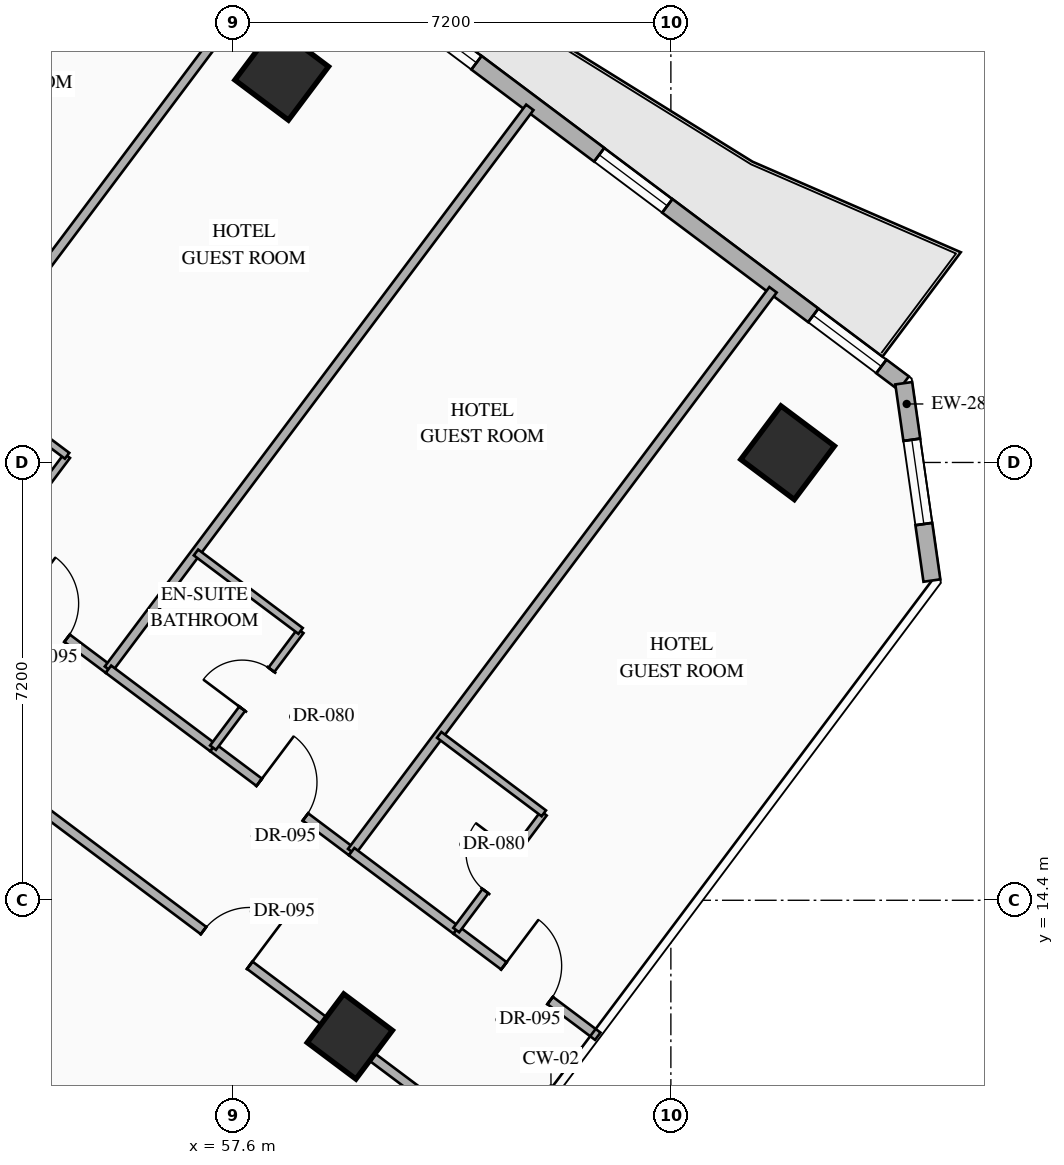
"""IFC4 building model, lengths in metres.
Left out: names, types, materials, properties, quantities, classifications, styles, units other than length and angle.
Written with IfcOpenShell. Run it as: python <this file> out.ifc"""

import sys

from ifc_helpers import new_model, si_unit, direction, frame, frame_2d, origin, origin_2d, place, context, subcontext, project, spatial, rectangle, hollow_rectangle, extrude, element, fill, save


model = new_model("IFC4")
c1 = context("Model", 3, precision=1e-05, world=origin(), true_north=direction((0.0, 1.0)))
c2 = subcontext(c1, "Body", "Model", "MODEL_VIEW")
j1 = project(units=[si_unit("LENGTHUNIT", "METRE"), si_unit("PLANEANGLEUNIT", "RADIAN")], contexts=[c1])
p1 = place(None, origin())
s1 = spatial("IfcSite", under=j1, at=p1, CompositionType="ELEMENT")
p2 = place(p1, origin())
s2 = spatial("IfcBuilding", under=s1, at=p2, CompositionType="ELEMENT")
p3 = place(p2, frame((0.0, 0.0, 56.7)))
s3 = spatial("IfcBuildingStorey", under=s2, at=p3, CompositionType="ELEMENT", Elevation=56.7)
for number, where, z_axis, x_axis in (
    (1, (58.4, 28.0, 0.0), (0.0, 0.0, 1.0), (0.8, -0.6, 0.0)),
    (2, (66.72, 21.76, 0.0), (0.0, 0.0, 1.0), (0.8, -0.6, 0.0)),
):
    element("IfcColumn", number, at=place(p3, frame(where, z_axis=z_axis, x_axis=x_axis)), inside=s3, PredefinedType="COLUMN", context=c2, shape_type="SweptSolid", body=[
        extrude(hollow_rectangle(XDim=1.1, YDim=1.1, WallThickness=0.04, at=origin_2d()), origin(), (0.0, 0.0, 1.0), 3.35),
    ])
p4 = place(p3, frame((59.52, 12.16, 0.0), z_axis=(0.0, 0.0, 1.0), x_axis=(0.799999996291, -0.600000004945, 0.0)))
e3 = element("IfcColumn", 3, at=p4, inside=s3, PredefinedType="COLUMN", context=c2, shape_type="SweptSolid", body=[
    extrude(hollow_rectangle(XDim=1.0, YDim=1.0, WallThickness=0.038, at=origin_2d()), origin(), (0.0, 0.0, 1.0), 3.35),
])
p5 = place(p3, frame((44.86, 40.73, 0.0), z_axis=(0.0, 0.0, 1.0), x_axis=(0.800006902154, -0.599990797017, 0.0)))
e4 = element("IfcWall", 4, at=p5, inside=s3, PredefinedType="STANDARD", context=c2, shape_type="SweptSolid", body=[
    extrude(rectangle(XDim=29.712, YDim=0.28, at=frame_2d((14.856, 0.0))), origin(), (0.0, 0.0, 1.0), 3.13),
])
p6 = place(p5, frame((14.249, 0.0, 0.0)))
e5 = element("IfcOpeningElement", 5, at=p6, cuts=e4, PredefinedType="OPENING", context=c2, shape_type="SweptSolid", body=[
    extrude(rectangle(XDim=1.1, YDim=2.2, at=frame_2d((0.55, 1.1))), frame((0.0, 0.15, 0.0), z_axis=(0.0, -1.0, 0.0), x_axis=(1.0, 0.0, 0.0)), (0.0, 0.0, 1.0), 0.3),
])
p7 = place(p5, frame((1.612, 0.0, 0.85)))
e6 = element("IfcOpeningElement", 6, at=p7, cuts=e4, PredefinedType="OPENING", context=c2, shape_type="SweptSolid", body=[
    extrude(rectangle(XDim=1.4, YDim=1.8, at=frame_2d((0.7, 0.9))), frame((0.0, 0.15, 0.0), z_axis=(0.0, -1.0, 0.0), x_axis=(1.0, 0.0, 0.0)), (0.0, 0.0, 1.0), 0.3),
])
p8 = place(p5, frame((5.667, 0.0, 0.85)))
e7 = element("IfcOpeningElement", 7, at=p8, cuts=e4, PredefinedType="OPENING", context=c2, shape_type="SweptSolid", body=[
    extrude(rectangle(XDim=1.4, YDim=1.8, at=frame_2d((0.7, 0.9))), frame((0.0, 0.15, 0.0), z_axis=(0.0, -1.0, 0.0), x_axis=(1.0, 0.0, 0.0)), (0.0, 0.0, 1.0), 0.3),
])
p9 = place(p5, frame((9.912, 0.0, 0.85)))
e8 = element("IfcOpeningElement", 8, at=p9, cuts=e4, PredefinedType="OPENING", context=c2, shape_type="SweptSolid", body=[
    extrude(rectangle(XDim=1.4, YDim=1.8, at=frame_2d((0.7, 0.9))), frame((0.0, 0.15, 0.0), z_axis=(0.0, -1.0, 0.0), x_axis=(1.0, 0.0, 0.0)), (0.0, 0.0, 1.0), 0.3),
])
p10 = place(p5, frame((19.528, 0.0, 0.85)))
e9 = element("IfcOpeningElement", 9, at=p10, cuts=e4, PredefinedType="OPENING", context=c2, shape_type="SweptSolid", body=[
    extrude(rectangle(XDim=1.4, YDim=1.8, at=frame_2d((0.7, 0.9))), frame((0.0, 0.15, 0.0), z_axis=(0.0, -1.0, 0.0), x_axis=(1.0, 0.0, 0.0)), (0.0, 0.0, 1.0), 0.3),
])
p11 = place(p5, frame((23.451, 0.0, 0.85)))
e10 = element("IfcOpeningElement", 10, at=p11, cuts=e4, PredefinedType="OPENING", context=c2, shape_type="SweptSolid", body=[
    extrude(rectangle(XDim=1.4, YDim=1.8, at=frame_2d((0.7, 0.9))), frame((0.0, 0.15, 0.0), z_axis=(0.0, -1.0, 0.0), x_axis=(1.0, 0.0, 0.0)), (0.0, 0.0, 1.0), 0.3),
])
p12 = place(p5, frame((27.852, 0.0, 0.85)))
e11 = element("IfcOpeningElement", 11, at=p12, cuts=e4, PredefinedType="OPENING", context=c2, shape_type="SweptSolid", body=[
    extrude(rectangle(XDim=1.4, YDim=1.8, at=frame_2d((0.7, 0.9))), frame((0.0, 0.15, 0.0), z_axis=(0.0, -1.0, 0.0), x_axis=(1.0, 0.0, 0.0)), (0.0, 0.0, 1.0), 0.3),
])
p13 = place(p3, frame((68.63, 22.903, 0.0), z_axis=(0.0, 0.0, 1.0), x_axis=(0.141285803956, -0.989968848803, 0.0)))
e12 = element("IfcWall", 12, at=p13, inside=s3, PredefinedType="STANDARD", context=c2, shape_type="SweptSolid", body=[
    extrude(rectangle(XDim=3.278, YDim=0.28, at=frame_2d((1.639, 0.0))), origin(), (0.0, 0.0, 1.0), 3.13),
])
p14 = place(p13, frame((0.939, 0.0, 0.85)))
e13 = element("IfcOpeningElement", 13, at=p14, cuts=e12, PredefinedType="OPENING", context=c2, shape_type="SweptSolid", body=[
    extrude(rectangle(XDim=1.4, YDim=1.8, at=frame_2d((0.7, 0.9))), frame((0.0, 0.15, 0.0), z_axis=(0.0, -1.0, 0.0), x_axis=(1.0, 0.0, 0.0)), (0.0, 0.0, 1.0), 0.3),
])
for number, where, z_axis, x_axis in (
    (14, (47.87, 23.96, 0.0), (0.0, 0.0, 1.0), (0.6, 0.8, 0.0)),
    (15, (51.71, 21.08, 0.0), (0.0, 0.0, 1.0), (0.6, 0.8, 0.0)),
):
    element("IfcWall", number, at=place(p3, frame(where, z_axis=z_axis, x_axis=x_axis)), inside=s3, PredefinedType="PARTITIONING", context=c2, shape_type="SweptSolid", body=[
        extrude(rectangle(XDim=11.55, YDim=0.15, at=frame_2d((5.775, 0.0))), origin(), (0.0, 0.0, 1.0), 3.13),
    ])
p15 = place(p3, frame((53.43, 19.79, 0.0), z_axis=(0.0, 0.0, 1.0), x_axis=(0.8, -0.6, 0.0)))
e16 = element("IfcWall", 16, at=p15, inside=s3, PredefinedType="PARTITIONING", context=c2, shape_type="SweptSolid", body=[
    extrude(rectangle(XDim=2.65, YDim=0.15, at=frame_2d((1.325, 0.0))), origin(), (0.0, 0.0, 1.0), 2.775),
])
p16 = place(p15, frame((0.85, 0.0, 0.0)))
e17 = element("IfcOpeningElement", 17, at=p16, cuts=e16, PredefinedType="OPENING", context=c2, shape_type="SweptSolid", body=[
    extrude(rectangle(XDim=0.95, YDim=2.15, at=frame_2d((0.475, 1.075))), frame((0.0, 0.085, 0.0), z_axis=(0.0, -1.0, 0.0), x_axis=(1.0, 0.0, 0.0)), (0.0, 0.0, 1.0), 0.17),
])
p17 = place(p3, frame((53.43, 19.79, 0.0), z_axis=(0.0, 0.0, 1.0), x_axis=(0.600065100855, 0.79995117022, 0.0)))
e18 = element("IfcWall", 18, at=p17, inside=s3, PredefinedType="PARTITIONING", context=c2, shape_type="SweptSolid", body=[
    extrude(rectangle(XDim=2.4, YDim=0.12, at=frame_2d((1.2, 0.0))), origin(), (0.0, 0.0, 1.0), 3.13),
])
p18 = place(p17, frame((0.8, 0.0, 0.0)))
e19 = element("IfcOpeningElement", 19, at=p18, cuts=e18, PredefinedType="OPENING", context=c2, shape_type="SweptSolid", body=[
    extrude(rectangle(XDim=0.8, YDim=2.06, at=frame_2d((0.4, 1.03))), frame((0.0, 0.07, 0.0), z_axis=(0.0, -1.0, 0.0), x_axis=(1.0, 0.0, 0.0)), (0.0, 0.0, 1.0), 0.14),
])
p19 = place(p3, frame((53.15, 23.0, 0.0), z_axis=(0.0, 0.0, 1.0), x_axis=(0.800027249606, -0.599963665473, 0.0)))
e20 = element("IfcWall", 20, at=p19, inside=s3, PredefinedType="PARTITIONING", context=c2, shape_type="SweptSolid", body=[
    extrude(rectangle(XDim=2.15, YDim=0.12, at=frame_2d((1.075, 0.0))), origin(), (0.0, 0.0, 1.0), 3.13),
])
p20 = place(p3, frame((55.55, 18.2, 0.0), z_axis=(0.0, 0.0, 1.0), x_axis=(0.599996617946, 0.80000253653, 0.0)))
e21 = element("IfcWall", 21, at=p20, inside=s3, PredefinedType="PARTITIONING", context=c2, shape_type="SweptSolid", body=[
    extrude(rectangle(XDim=11.55, YDim=0.15, at=frame_2d((5.775, 0.0))), origin(), (0.0, 0.0, 1.0), 3.13),
])
p21 = place(p3, frame((55.55, 18.2, 0.0), z_axis=(0.0, 0.0, 1.0), x_axis=(0.79998637334, -0.60001816845, 0.0)))
e22 = element("IfcWall", 22, at=p21, inside=s3, PredefinedType="PARTITIONING", context=c2, shape_type="SweptSolid", body=[
    extrude(rectangle(XDim=2.15, YDim=0.15, at=frame_2d((1.075, 0.0))), origin(), (0.0, 0.0, 1.0), 2.775),
])
p22 = place(p3, frame((57.27, 16.91, 0.0), z_axis=(0.0, 0.0, 1.0), x_axis=(0.800010279488, -0.599986293772, 0.0)))
e23 = element("IfcWall", 23, at=p22, inside=s3, PredefinedType="PARTITIONING", context=c2, shape_type="SweptSolid", body=[
    extrude(rectangle(XDim=2.85, YDim=0.15, at=frame_2d((1.425, 0.0))), origin(), (0.0, 0.0, 1.0), 2.775),
])
p23 = place(p22, frame((0.95, 0.0, 0.0)))
e24 = element("IfcOpeningElement", 24, at=p23, cuts=e23, PredefinedType="OPENING", context=c2, shape_type="SweptSolid", body=[
    extrude(rectangle(XDim=0.95, YDim=2.15, at=frame_2d((0.475, 1.075))), frame((0.0, 0.085, 0.0), z_axis=(0.0, -1.0, 0.0), x_axis=(1.0, 0.0, 0.0)), (0.0, 0.0, 1.0), 0.17),
])
p24 = place(p3, frame((57.27, 16.91, 0.0), z_axis=(0.0, 0.0, 1.0), x_axis=(0.599951172744, 0.800036618114, 0.0)))
e25 = element("IfcWall", 25, at=p24, inside=s3, PredefinedType="PARTITIONING", context=c2, shape_type="SweptSolid", body=[
    extrude(rectangle(XDim=2.4, YDim=0.12, at=frame_2d((1.2, 0.0))), origin(), (0.0, 0.0, 1.0), 3.13),
])
p25 = place(p24, frame((0.8, 0.0, 0.0)))
e26 = element("IfcOpeningElement", 26, at=p25, cuts=e25, PredefinedType="OPENING", context=c2, shape_type="SweptSolid", body=[
    extrude(rectangle(XDim=0.8, YDim=2.06, at=frame_2d((0.4, 1.03))), frame((0.0, 0.07, 0.0), z_axis=(0.0, -1.0, 0.0), x_axis=(1.0, 0.0, 0.0)), (0.0, 0.0, 1.0), 0.14),
])
p26 = place(p3, frame((56.99, 20.12, 0.0), z_axis=(0.0, 0.0, 1.0), x_axis=(0.79998637334, -0.60001816845, 0.0)))
e27 = element("IfcWall", 27, at=p26, inside=s3, PredefinedType="PARTITIONING", context=c2, shape_type="SweptSolid", body=[
    extrude(rectangle(XDim=2.15, YDim=0.12, at=frame_2d((1.075, 0.0))), origin(), (0.0, 0.0, 1.0), 3.13),
])
p27 = place(p3, frame((59.55, 15.2, 0.0), z_axis=(0.0, 0.0, 1.0), x_axis=(0.599996617946, 0.80000253653, 0.0)))
e28 = element("IfcWall", 28, at=p27, inside=s3, PredefinedType="PARTITIONING", context=c2, shape_type="SweptSolid", body=[
    extrude(rectangle(XDim=11.55, YDim=0.15, at=frame_2d((5.775, 0.0))), origin(), (0.0, 0.0, 1.0), 3.13),
])
p28 = place(p3, frame((59.55, 15.2, 0.0), z_axis=(0.0, 0.0, 1.0), x_axis=(0.79998637334, -0.60001816845, 0.0)))
e29 = element("IfcWall", 29, at=p28, inside=s3, PredefinedType="PARTITIONING", context=c2, shape_type="SweptSolid", body=[
    extrude(rectangle(XDim=2.15, YDim=0.15, at=frame_2d((1.075, 0.0))), origin(), (0.0, 0.0, 1.0), 2.775),
])
p29 = place(p3, frame((61.27, 13.91, 0.0), z_axis=(0.0, 0.0, 1.0), x_axis=(0.800010068184, -0.59998657552, 0.0)))
e30 = element("IfcWall", 30, at=p29, inside=s3, PredefinedType="PARTITIONING", context=c2, shape_type="SweptSolid", body=[
    extrude(rectangle(XDim=2.91, YDim=0.15, at=frame_2d((1.455, 0.0))), origin(), (0.0, 0.0, 1.0), 3.13),
])
p30 = place(p29, frame((0.98, 0.0, 0.0)))
e31 = element("IfcOpeningElement", 31, at=p30, cuts=e30, PredefinedType="OPENING", context=c2, shape_type="SweptSolid", body=[
    extrude(rectangle(XDim=0.95, YDim=2.15, at=frame_2d((0.475, 1.075))), frame((0.0, 0.085, 0.0), z_axis=(0.0, -1.0, 0.0), x_axis=(1.0, 0.0, 0.0)), (0.0, 0.0, 1.0), 0.17),
])
p31 = place(p3, frame((61.27, 13.91, 0.0), z_axis=(0.0, 0.0, 1.0), x_axis=(0.599951172744, 0.800036618114, 0.0)))
e32 = element("IfcWall", 32, at=p31, inside=s3, PredefinedType="PARTITIONING", context=c2, shape_type="SweptSolid", body=[
    extrude(rectangle(XDim=2.4, YDim=0.12, at=frame_2d((1.2, 0.0))), origin(), (0.0, 0.0, 1.0), 3.13),
])
p32 = place(p31, frame((0.8, 0.0, 0.0)))
e33 = element("IfcOpeningElement", 33, at=p32, cuts=e32, PredefinedType="OPENING", context=c2, shape_type="SweptSolid", body=[
    extrude(rectangle(XDim=0.8, YDim=2.06, at=frame_2d((0.4, 1.03))), frame((0.0, 0.07, 0.0), z_axis=(0.0, -1.0, 0.0), x_axis=(1.0, 0.0, 0.0)), (0.0, 0.0, 1.0), 0.14),
])
p33 = place(p3, frame((60.99, 17.12, 0.0), z_axis=(0.0, 0.0, 1.0), x_axis=(0.79998637334, -0.60001816845, 0.0)))
e34 = element("IfcWall", 34, at=p33, inside=s3, PredefinedType="PARTITIONING", context=c2, shape_type="SweptSolid", body=[
    extrude(rectangle(XDim=2.15, YDim=0.12, at=frame_2d((1.075, 0.0))), origin(), (0.0, 0.0, 1.0), 3.13),
])
p34 = place(p3, frame((52.89, 17.07, 0.0), z_axis=(0.0, 0.0, 1.0), x_axis=(0.8, -0.6, 0.0)))
e35 = element("IfcWall", 35, at=p34, inside=s3, PredefinedType="PARTITIONING", context=c2, shape_type="SweptSolid", body=[
    extrude(rectangle(XDim=11.51, YDim=0.15, at=frame_2d((5.755, 0.0))), origin(), (0.0, 0.0, 1.0), 2.425),
])
p35 = place(p34, frame((5.28, 0.0, 0.0)))
e36 = element("IfcOpeningElement", 36, at=p35, cuts=e35, PredefinedType="OPENING", context=c2, shape_type="SweptSolid", body=[
    extrude(rectangle(XDim=0.95, YDim=2.15, at=frame_2d((0.475, 1.075))), frame((0.0, 0.085, 0.0), z_axis=(0.0, -1.0, 0.0), x_axis=(1.0, 0.0, 0.0)), (0.0, 0.0, 1.0), 0.17),
])
p36 = place(p10, origin())
e37 = element("IfcWindow", 37, at=p36, inside=s3, PartitioningType="SINGLE_PANEL", PredefinedType="WINDOW", context=c2, shape_type="SweptSolid", body=[
    extrude(rectangle(XDim=1.4, YDim=1.8, at=frame_2d((0.7, 0.9))), frame((0.0, 0.03, 0.0), z_axis=(0.0, -1.0, 0.0), x_axis=(1.0, 0.0, 0.0)), (0.0, 0.0, 1.0), 0.06),
])
fill(e9, e37)
p37 = place(p11, origin())
e38 = element("IfcWindow", 38, at=p37, inside=s3, PartitioningType="SINGLE_PANEL", PredefinedType="WINDOW", context=c2, shape_type="SweptSolid", body=[
    extrude(rectangle(XDim=1.4, YDim=1.8, at=frame_2d((0.7, 0.9))), frame((0.0, 0.03, 0.0), z_axis=(0.0, -1.0, 0.0), x_axis=(1.0, 0.0, 0.0)), (0.0, 0.0, 1.0), 0.06),
])
fill(e10, e38)
p38 = place(p12, origin())
e39 = element("IfcWindow", 39, at=p38, inside=s3, PartitioningType="SINGLE_PANEL", PredefinedType="WINDOW", context=c2, shape_type="SweptSolid", body=[
    extrude(rectangle(XDim=1.4, YDim=1.8, at=frame_2d((0.7, 0.9))), frame((0.0, 0.03, 0.0), z_axis=(0.0, -1.0, 0.0), x_axis=(1.0, 0.0, 0.0)), (0.0, 0.0, 1.0), 0.06),
])
fill(e11, e39)
p39 = place(p14, origin())
e40 = element("IfcWindow", 40, at=p39, inside=s3, PartitioningType="SINGLE_PANEL", PredefinedType="WINDOW", context=c2, shape_type="SweptSolid", body=[
    extrude(rectangle(XDim=1.4, YDim=1.8, at=frame_2d((0.7, 0.9))), frame((0.0, 0.03, 0.0), z_axis=(0.0, -1.0, 0.0), x_axis=(1.0, 0.0, 0.0)), (0.0, 0.0, 1.0), 0.06),
])
fill(e13, e40)
p40 = place(p16, origin())
e41 = element("IfcDoor", 41, at=p40, inside=s3, OperationType="SINGLE_SWING_LEFT", PredefinedType="DOOR", context=c2, shape_type="SweptSolid", body=[
    extrude(rectangle(XDim=0.95, YDim=2.15, at=frame_2d((0.475, 1.075))), frame((0.0, 0.025, 0.0), z_axis=(0.0, -1.0, 0.0), x_axis=(1.0, 0.0, 0.0)), (0.0, 0.0, 1.0), 0.05),
])
fill(e17, e41)
p41 = place(p23, origin())
e42 = element("IfcDoor", 42, at=p41, inside=s3, OperationType="SINGLE_SWING_LEFT", PredefinedType="DOOR", context=c2, shape_type="SweptSolid", body=[
    extrude(rectangle(XDim=0.95, YDim=2.15, at=frame_2d((0.475, 1.075))), frame((0.0, 0.025, 0.0), z_axis=(0.0, -1.0, 0.0), x_axis=(1.0, 0.0, 0.0)), (0.0, 0.0, 1.0), 0.05),
])
fill(e24, e42)
p42 = place(p25, origin())
e43 = element("IfcDoor", 43, at=p42, inside=s3, OperationType="SINGLE_SWING_LEFT", PredefinedType="DOOR", context=c2, shape_type="SweptSolid", body=[
    extrude(rectangle(XDim=0.8, YDim=2.06, at=frame_2d((0.4, 1.03))), frame((0.0, 0.025, 0.0), z_axis=(0.0, -1.0, 0.0), x_axis=(1.0, 0.0, 0.0)), (0.0, 0.0, 1.0), 0.05),
])
fill(e26, e43)
p43 = place(p30, origin())
e44 = element("IfcDoor", 44, at=p43, inside=s3, OperationType="SINGLE_SWING_LEFT", PredefinedType="DOOR", context=c2, shape_type="SweptSolid", body=[
    extrude(rectangle(XDim=0.95, YDim=2.15, at=frame_2d((0.475, 1.075))), frame((0.0, 0.025, 0.0), z_axis=(0.0, -1.0, 0.0), x_axis=(1.0, 0.0, 0.0)), (0.0, 0.0, 1.0), 0.05),
])
fill(e31, e44)
p44 = place(p32, origin())
e45 = element("IfcDoor", 45, at=p44, inside=s3, OperationType="SINGLE_SWING_RIGHT", PredefinedType="DOOR", context=c2, shape_type="SweptSolid", body=[
    extrude(rectangle(XDim=0.8, YDim=2.06, at=frame_2d((0.4, 1.03))), frame((0.0, 0.025, 0.0), z_axis=(0.0, -1.0, 0.0), x_axis=(1.0, 0.0, 0.0)), (0.0, 0.0, 1.0), 0.05),
])
fill(e33, e45)
p45 = place(p35, origin())
e46 = element("IfcDoor", 46, at=p45, inside=s3, OperationType="SINGLE_SWING_RIGHT", PredefinedType="DOOR", context=c2, shape_type="SweptSolid", body=[
    extrude(rectangle(XDim=0.95, YDim=2.15, at=frame_2d((0.475, 1.075))), frame((0.0, 0.025, 0.0), z_axis=(0.0, -1.0, 0.0), x_axis=(1.0, 0.0, 0.0)), (0.0, 0.0, 1.0), 0.05),
])
fill(e36, e46)
save(model, sys.argv[1])
